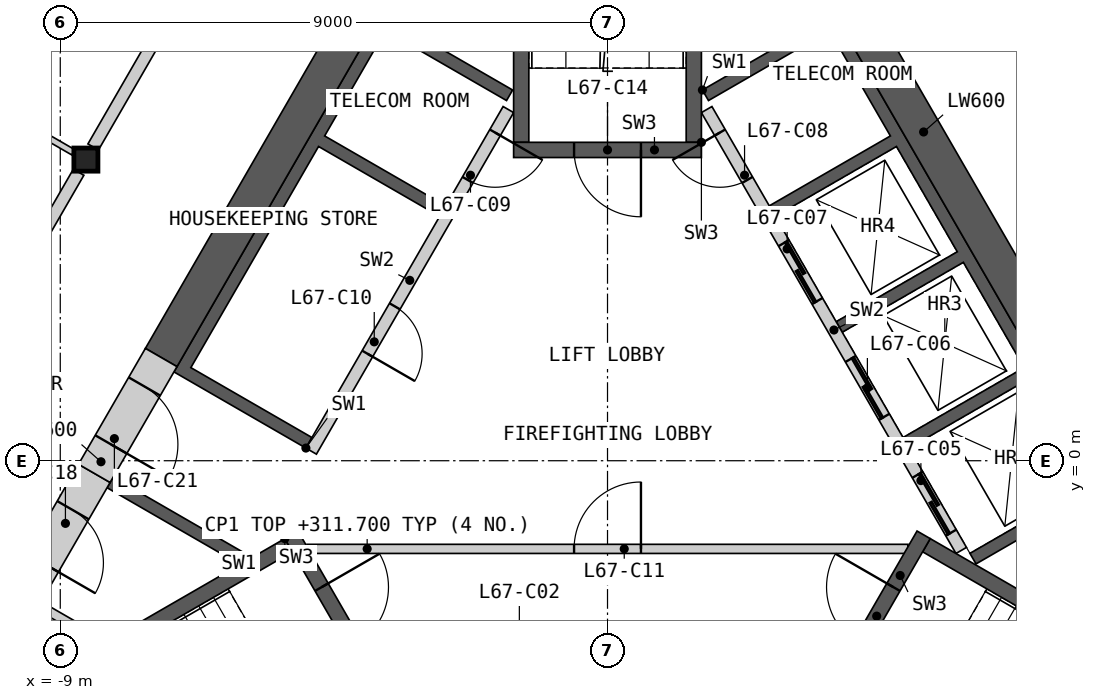
"""IFC4 building model, lengths in metres.
Left out: names, types, materials, properties, quantities, classifications, styles, units other than length and angle.
Written with IfcOpenShell. Run it as: python <this file> out.ifc"""

import sys

from ifc_helpers import new_model, si_unit, direction, frame, frame_2d, origin, origin_2d, place, context, subcontext, project, spatial, polyline, rectangle, i_section, outline, extrude, element, fill, save


model = new_model("IFC4")
c1 = context("Model", 3, precision=1e-05, world=origin(), true_north=direction((0.0, 1.0)))
c2 = subcontext(c1, "Body", "Model", "MODEL_VIEW")
j1 = project(units=[si_unit("LENGTHUNIT", "METRE"), si_unit("PLANEANGLEUNIT", "RADIAN")], contexts=[c1])
p1 = place(None, origin())
s1 = spatial("IfcSite", under=j1, at=p1, CompositionType="ELEMENT")
p2 = place(p1, origin())
s2 = spatial("IfcBuilding", under=s1, at=p2, CompositionType="ELEMENT")
p3 = place(p2, frame((0.0, 0.0, 308.6)))
s3 = spatial("IfcBuildingStorey", under=s2, at=p3, CompositionType="ELEMENT", Elevation=308.6)
p4 = place(p3, frame((-8.578, 4.953, 0.0), z_axis=(0.0, 0.0, 1.0), x_axis=(1.0, 0.0, 0.0)))
e1 = element("IfcColumn", 1, at=p4, inside=s3, PredefinedType="COLUMN", context=c2, shape_type="SweptSolid", body=[
    extrude(i_section(OverallWidth=0.396, OverallDepth=0.381, WebThickness=0.019, FlangeThickness=0.03, at=origin_2d()), origin(), (0.0, 0.0, 1.0), 3.4),
])
p5 = place(p3, origin())
e2 = element("IfcWall", 2, at=p5, inside=s3, PredefinedType="SHEAR", context=c2, shape_type="SweptSolid", body=[
    extrude(outline(polyline([(1.561, 6.097), (3.731, 7.35), (8.231, -0.444), (6.061, -1.697), (5.96, -1.524), (7.952, -0.374), (6.952, 1.358), (4.96, 0.208), (4.861, 0.381), (6.852, 1.531), (5.852, 3.263), (3.861, 2.113), (3.76, 2.287), (5.752, 3.437), (4.752, 5.169), (2.76, 4.019), (2.66, 4.192), (4.652, 5.342), (3.652, 7.074), (1.66, 5.924), (1.561, 6.097)])), origin(), (0.0, 0.0, 1.0), 3.1),
])
p6 = place(p3, frame((5.817, -1.476, 0.0), z_axis=(0.0, 0.0, 1.0), x_axis=(-0.500002616675, 0.866023893041, 0.0)))
e3 = element("IfcWall", 3, at=p6, inside=s3, PredefinedType="SOLIDWALL", context=c2, shape_type="SweptSolid", body=[
    extrude(rectangle(XDim=8.373, YDim=0.2, at=frame_2d((4.187, 0.0))), origin(), (0.0, 0.0, 1.0), 3.1),
])
p7 = place(p6, frame((0.337, 0.0, 0.0)))
e4 = element("IfcOpeningElement", 4, at=p7, cuts=e3, PredefinedType="OPENING", context=c2, shape_type="SweptSolid", body=[
    extrude(rectangle(XDim=1.1, YDim=2.1, at=frame_2d((0.55, 1.05))), frame((0.0, 0.11, 0.0), z_axis=(0.0, -1.0, 0.0), x_axis=(1.0, 0.0, 0.0)), (0.0, 0.0, 1.0), 0.22),
])
p8 = place(p6, frame((2.537, 0.0, 0.0)))
e5 = element("IfcOpeningElement", 5, at=p8, cuts=e3, PredefinedType="OPENING", context=c2, shape_type="SweptSolid", body=[
    extrude(rectangle(XDim=1.1, YDim=2.1, at=frame_2d((0.55, 1.05))), frame((0.0, 0.11, 0.0), z_axis=(0.0, -1.0, 0.0), x_axis=(1.0, 0.0, 0.0)), (0.0, 0.0, 1.0), 0.22),
])
p9 = place(p6, frame((4.737, 0.0, 0.0)))
e6 = element("IfcOpeningElement", 6, at=p9, cuts=e3, PredefinedType="OPENING", context=c2, shape_type="SweptSolid", body=[
    extrude(rectangle(XDim=1.1, YDim=2.1, at=frame_2d((0.55, 1.05))), frame((0.0, 0.11, 0.0), z_axis=(0.0, -1.0, 0.0), x_axis=(1.0, 0.0, 0.0)), (0.0, 0.0, 1.0), 0.22),
])
p10 = place(p6, frame((7.037, 0.0, 0.0)))
e7 = element("IfcOpeningElement", 7, at=p10, cuts=e3, PredefinedType="OPENING", context=c2, shape_type="SweptSolid", body=[
    extrude(rectangle(XDim=0.9, YDim=2.1, at=frame_2d((0.45, 1.05))), frame((0.0, 0.11, 0.0), z_axis=(0.0, -1.0, 0.0), x_axis=(1.0, 0.0, 0.0)), (0.0, 0.0, 1.0), 0.22),
])
p11 = place(p3, origin())
e8 = element("IfcWall", 8, at=p11, inside=s3, PredefinedType="SHEAR", context=c2, shape_type="SweptSolid", body=[
    extrude(outline(polyline([(-6.061, -1.697), (-8.231, -0.444), (-8.131, -0.271), (-5.96, -1.524), (-6.061, -1.697)])), origin(), (0.0, 0.0, 1.0), 3.1),
])
p12 = place(p3, origin())
e9 = element("IfcWall", 9, at=p12, inside=s3, PredefinedType="SHEAR", context=c2, shape_type="SweptSolid", body=[
    extrude(outline(polyline([(-4.96, 0.208), (-7.131, 1.461), (-3.731, 7.35), (-1.561, 6.097), (-1.66, 5.924), (-3.652, 7.074), (-4.652, 5.342), (-2.66, 4.192), (-2.76, 4.019), (-4.752, 5.169), (-6.852, 1.531), (-4.861, 0.381), (-4.96, 0.208)])), origin(), (0.0, 0.0, 1.0), 3.1),
])
p13 = place(p3, frame((-1.631, 5.776, 0.0), z_axis=(0.0, 0.0, 1.0), x_axis=(-0.499992876559, -0.866029516466, 0.0)))
e10 = element("IfcWall", 10, at=p13, inside=s3, PredefinedType="SOLIDWALL", context=c2, shape_type="SweptSolid", body=[
    extrude(rectangle(XDim=6.486, YDim=0.2, at=frame_2d((3.243, 0.0))), origin(), (0.0, 0.0, 1.0), 3.1),
])
p14 = place(p13, frame((0.437, 0.0, 0.0)))
e11 = element("IfcOpeningElement", 11, at=p14, cuts=e10, PredefinedType="OPENING", context=c2, shape_type="SweptSolid", body=[
    extrude(rectangle(XDim=0.9, YDim=2.1, at=frame_2d((0.45, 1.05))), frame((0.0, 0.11, 0.0), z_axis=(0.0, -1.0, 0.0), x_axis=(1.0, 0.0, 0.0)), (0.0, 0.0, 1.0), 0.22),
])
p15 = place(p13, frame((3.737, 0.0, 0.0)))
e12 = element("IfcOpeningElement", 12, at=p15, cuts=e10, PredefinedType="OPENING", context=c2, shape_type="SweptSolid", body=[
    extrude(rectangle(XDim=0.9, YDim=2.1, at=frame_2d((0.45, 1.05))), frame((0.0, 0.11, 0.0), z_axis=(0.0, -1.0, 0.0), x_axis=(1.0, 0.0, 0.0)), (0.0, 0.0, 1.0), 0.22),
])
p16 = place(p3, frame((-4.941, -1.45, 0.0), z_axis=(0.0, 0.0, 1.0), x_axis=(1.0, 0.0, 0.0)))
e13 = element("IfcWall", 13, at=p16, inside=s3, PredefinedType="PARTITIONING", context=c2, shape_type="SweptSolid", body=[
    extrude(rectangle(XDim=9.882, YDim=0.15, at=frame_2d((4.941, 0.0))), origin(), (0.0, 0.0, 1.0), 3.1),
])
p17 = place(p16, frame((4.391, 0.0, 0.0)))
e14 = element("IfcOpeningElement", 14, at=p17, cuts=e13, PredefinedType="OPENING", context=c2, shape_type="SweptSolid", body=[
    extrude(rectangle(XDim=1.1, YDim=2.1, at=frame_2d((0.55, 1.05))), frame((0.0, 0.085, 0.0), z_axis=(0.0, -1.0, 0.0), x_axis=(1.0, 0.0, 0.0)), (0.0, 0.0, 1.0), 0.17),
])
p18 = place(p3, origin())
e15 = element("IfcWall", 15, at=p18, inside=s3, PredefinedType="SHEAR", context=c2, shape_type="SweptSolid", body=[
    extrude(outline(polyline([(-5.307, -1.281), (-10.374, -4.206), (-10.032, -4.298), (-5.182, -1.498), (-5.307, -1.281)])), origin(), (0.0, 0.0, 1.0), 3.1),
])
p19 = place(p3, frame((-5.199, -1.219, 0.0), z_axis=(0.0, 0.0, 1.0), x_axis=(0.499982516597, -0.866035497597, 0.0)))
e16 = element("IfcWall", 16, at=p19, inside=s3, PredefinedType="SHEAR", context=c2, shape_type="SweptSolid", body=[
    extrude(rectangle(XDim=3.088, YDim=0.25, at=frame_2d((1.544, 0.0))), origin(), (0.0, 0.0, 1.0), 3.1),
])
p20 = place(p19, frame((0.994, 0.0, 0.0)))
e17 = element("IfcOpeningElement", 17, at=p20, cuts=e16, PredefinedType="OPENING", context=c2, shape_type="SweptSolid", body=[
    extrude(rectangle(XDim=1.1, YDim=2.1, at=frame_2d((0.55, 1.05))), frame((0.0, 0.135, 0.0), z_axis=(0.0, -1.0, 0.0), x_axis=(1.0, 0.0, 0.0)), (0.0, 0.0, 1.0), 0.27),
])
p21 = place(p3, origin())
e18 = element("IfcWall", 18, at=p21, inside=s3, PredefinedType="SHEAR", context=c2, shape_type="SweptSolid", body=[
    extrude(outline(polyline([(10.032, -4.298), (10.374, -4.206), (5.307, -1.281), (5.182, -1.498), (10.032, -4.298)])), origin(), (0.0, 0.0, 1.0), 3.1),
])
p22 = place(p3, frame((3.655, -3.893, 0.0), z_axis=(0.0, 0.0, 1.0), x_axis=(0.499982516597, 0.866035497597, 0.0)))
e19 = element("IfcWall", 19, at=p22, inside=s3, PredefinedType="SHEAR", context=c2, shape_type="SweptSolid", body=[
    extrude(rectangle(XDim=3.088, YDim=0.25, at=frame_2d((1.544, 0.0))), origin(), (0.0, 0.0, 1.0), 3.1),
])
p23 = place(p22, frame((0.994, 0.0, 0.0)))
e20 = element("IfcOpeningElement", 20, at=p23, cuts=e19, PredefinedType="OPENING", context=c2, shape_type="SweptSolid", body=[
    extrude(rectangle(XDim=1.1, YDim=2.1, at=frame_2d((0.55, 1.05))), frame((0.0, 0.135, 0.0), z_axis=(0.0, -1.0, 0.0), x_axis=(1.0, 0.0, 0.0)), (0.0, 0.0, 1.0), 0.27),
])
p24 = place(p3, origin())
e21 = element("IfcWall", 21, at=p24, inside=s3, PredefinedType="SHEAR", context=c2, shape_type="SweptSolid", body=[
    extrude(outline(polyline([(1.544, 5.237), (1.544, 11.087), (1.294, 10.837), (1.294, 5.237), (1.544, 5.237)])), origin(), (0.0, 0.0, 1.0), 3.1),
])
p25 = place(p3, origin())
e22 = element("IfcWall", 22, at=p25, inside=s3, PredefinedType="SHEAR", context=c2, shape_type="SweptSolid", body=[
    extrude(outline(polyline([(-1.294, 10.837), (-1.544, 11.087), (-1.544, 5.237), (-1.294, 5.237), (-1.294, 10.837)])), origin(), (0.0, 0.0, 1.0), 3.1),
])
p26 = place(p3, frame((1.544, 5.112, 0.0), z_axis=(0.0, 0.0, 1.0), x_axis=(-1.0, 0.0, 0.0)))
e23 = element("IfcWall", 23, at=p26, inside=s3, PredefinedType="SHEAR", context=c2, shape_type="SweptSolid", body=[
    extrude(rectangle(XDim=3.088, YDim=0.25, at=frame_2d((1.544, 0.0))), origin(), (0.0, 0.0, 1.0), 3.1),
])
p27 = place(p26, frame((0.994, 0.0, 0.0)))
e24 = element("IfcOpeningElement", 24, at=p27, cuts=e23, PredefinedType="OPENING", context=c2, shape_type="SweptSolid", body=[
    extrude(rectangle(XDim=1.1, YDim=2.1, at=frame_2d((0.55, 1.05))), frame((0.0, 0.135, 0.0), z_axis=(0.0, -1.0, 0.0), x_axis=(1.0, 0.0, 0.0)), (0.0, 0.0, 1.0), 0.27),
])
p28 = place(p3, frame((-9.35, -2.383, 0.0), z_axis=(0.0, 0.0, 1.0), x_axis=(0.866057962423, -0.499943602543, 0.0)))
e25 = element("IfcWall", 25, at=p28, inside=s3, PredefinedType="PARTITIONING", context=c2, shape_type="SweptSolid", body=[
    extrude(rectangle(XDim=1.242, YDim=0.15, at=frame_2d((0.621, 0.0))), origin(), (0.0, 0.0, 1.0), 3.1),
])
p29 = place(p3, frame((8.841, -0.902, 0.0), z_axis=(0.0, 0.0, 1.0), x_axis=(-0.499995618375, 0.866027933502, 0.0)))
e26 = element("IfcWall", 26, at=p29, inside=s3, PredefinedType="SHEAR", context=c2, shape_type="SweptSolid", body=[
    extrude(rectangle(XDim=14.571, YDim=0.6, at=frame_2d((7.285, 0.0))), origin(), (0.0, 0.0, 1.0), 3.1),
])
p30 = place(p3, frame((-3.639, 8.107, 0.0), z_axis=(0.0, 0.0, 1.0), x_axis=(-0.49999180351, -0.866030135978, 0.0)))
e27 = element("IfcWall", 27, at=p30, inside=s3, PredefinedType="SHEAR", context=c2, shape_type="SweptSolid", body=[
    extrude(rectangle(XDim=7.401, YDim=0.6, at=frame_2d((3.701, 0.0))), origin(), (0.0, 0.0, 1.0), 3.1),
])
p31 = place(p3, frame((-8.44, -0.208, 0.0), z_axis=(0.0, 0.0, 1.0), x_axis=(-0.500001951578, -0.866024277037, 0.0)))
e28 = element("IfcWall", 28, at=p31, inside=s3, PredefinedType="SHEAR", context=c2, shape_type="SweptSolid", body=[
    extrude(rectangle(XDim=2.243, YDim=0.6, at=frame_2d((1.122, 0.0))), origin(), (0.0, 0.0, 1.0), 3.1),
])
p32 = place(p31, frame((0.7, 0.0, 0.0)))
e29 = element("IfcOpeningElement", 29, at=p32, cuts=e28, PredefinedType="OPENING", context=c2, shape_type="SweptSolid", body=[
    extrude(rectangle(XDim=1.0, YDim=2.1, at=frame_2d((0.5, 1.05))), frame((0.0, 0.31, 0.0), z_axis=(0.0, -1.0, 0.0), x_axis=(1.0, 0.0, 0.0)), (0.0, 0.0, 1.0), 0.62),
])
p33 = place(p3, frame((-7.34, 1.698, 0.0), z_axis=(0.0, 0.0, 1.0), x_axis=(-0.50002983664, -0.866008176907, 0.0)))
e30 = element("IfcWall", 30, at=p33, inside=s3, PredefinedType="SHEAR", context=c2, shape_type="SweptSolid", body=[
    extrude(rectangle(XDim=2.2, YDim=0.6, at=frame_2d((1.1, 0.0))), origin(), (0.0, 0.0, 1.0), 3.1),
])
p34 = place(p33, frame((0.55, 0.0, 0.0)))
e31 = element("IfcOpeningElement", 31, at=p34, cuts=e30, PredefinedType="OPENING", context=c2, shape_type="SweptSolid", body=[
    extrude(rectangle(XDim=1.1, YDim=2.1, at=frame_2d((0.55, 1.05))), frame((0.0, 0.31, 0.0), z_axis=(0.0, -1.0, 0.0), x_axis=(1.0, 0.0, 0.0)), (0.0, 0.0, 1.0), 0.62),
])
p35 = place(p3, frame((4.409, 12.174, 0.0), z_axis=(0.0, 0.0, 1.0), x_axis=(0.499984266882, -0.866034487114, 0.0)))
e32 = element("IfcWall", 32, at=p35, inside=s3, PredefinedType="PARTITIONING", context=c2, shape_type="SweptSolid", body=[
    extrude(rectangle(XDim=8.099, YDim=0.2, at=frame_2d((4.049, 0.0))), origin(), (0.0, 0.0, 1.0), 3.1),
])
p36 = place(p35, frame((5.123, 0.0, 0.0)))
e33 = element("IfcOpeningElement", 33, at=p36, cuts=e32, PredefinedType="OPENING", context=c2, shape_type="SweptSolid", body=[
    extrude(rectangle(XDim=1.0, YDim=2.1, at=frame_2d((0.5, 1.05))), frame((0.0, 0.11, 0.0), z_axis=(0.0, -1.0, 0.0), x_axis=(1.0, 0.0, 0.0)), (0.0, 0.0, 1.0), 0.22),
])
p37 = place(p35, frame((1.164, 0.0, 0.0)))
e34 = element("IfcOpeningElement", 34, at=p37, cuts=e32, PredefinedType="OPENING", context=c2, shape_type="SweptSolid", body=[
    extrude(rectangle(XDim=1.0, YDim=2.1, at=frame_2d((0.5, 1.05))), frame((0.0, 0.11, 0.0), z_axis=(0.0, -1.0, 0.0), x_axis=(1.0, 0.0, 0.0)), (0.0, 0.0, 1.0), 0.22),
])
p38 = place(p3, frame((-8.458, 5.16, 0.0), z_axis=(0.0, 0.0, 1.0), x_axis=(0.499984266882, 0.866034487114, 0.0)))
e35 = element("IfcWall", 35, at=p38, inside=s3, PredefinedType="PARTITIONING", context=c2, shape_type="SweptSolid", body=[
    extrude(rectangle(XDim=8.099, YDim=0.2, at=frame_2d((4.049, 0.0))), origin(), (0.0, 0.0, 1.0), 3.1),
])
p39 = place(p38, frame((3.093, 0.0, 0.0)))
e36 = element("IfcOpeningElement", 36, at=p39, cuts=e35, PredefinedType="OPENING", context=c2, shape_type="SweptSolid", body=[
    extrude(rectangle(XDim=1.0, YDim=2.1, at=frame_2d((0.5, 1.05))), frame((0.0, 0.11, 0.0), z_axis=(0.0, -1.0, 0.0), x_axis=(1.0, 0.0, 0.0)), (0.0, 0.0, 1.0), 0.22),
])
p40 = place(p3, frame((-12.748, -2.269, 0.0), z_axis=(0.0, 0.0, 1.0), x_axis=(0.499984266882, 0.866034487114, 0.0)))
e37 = element("IfcWall", 37, at=p40, inside=s3, PredefinedType="PARTITIONING", context=c2, shape_type="SweptSolid", body=[
    extrude(rectangle(XDim=8.099, YDim=0.2, at=frame_2d((4.049, 0.0))), origin(), (0.0, 0.0, 1.0), 3.1),
])
p41 = place(p40, frame((1.164, 0.0, 0.0)))
e38 = element("IfcOpeningElement", 38, at=p41, cuts=e37, PredefinedType="OPENING", context=c2, shape_type="SweptSolid", body=[
    extrude(rectangle(XDim=1.0, YDim=2.1, at=frame_2d((0.5, 1.05))), frame((0.0, 0.11, 0.0), z_axis=(0.0, -1.0, 0.0), x_axis=(1.0, 0.0, 0.0)), (0.0, 0.0, 1.0), 0.22),
])
p42 = place(p3, frame((-16.054, 3.419, 0.0), z_axis=(0.0, 0.0, 1.0), x_axis=(0.499999256795, 0.866025832873, 0.0)))
e39 = element("IfcWall", 39, at=p42, inside=s3, PredefinedType="PARTITIONING", context=c2, shape_type="SweptSolid", body=[
    extrude(rectangle(XDim=15.448, YDim=0.1, at=frame_2d((7.724, 0.0))), origin(), (0.0, 0.0, 1.0), 2.33),
])
p43 = place(p42, frame((8.306, 0.0, 0.0)))
e40 = element("IfcOpeningElement", 40, at=p43, cuts=e39, PredefinedType="OPENING", context=c2, shape_type="SweptSolid", body=[
    extrude(rectangle(XDim=0.95, YDim=2.1, at=frame_2d((0.475, 1.05))), frame((0.0, 0.06, 0.0), z_axis=(0.0, -1.0, 0.0), x_axis=(1.0, 0.0, 0.0)), (0.0, 0.0, 1.0), 0.12),
])
p44 = place(p42, frame((1.76, 0.0, 0.0)))
e41 = element("IfcOpeningElement", 41, at=p44, cuts=e39, PredefinedType="OPENING", context=c2, shape_type="SweptSolid", body=[
    extrude(rectangle(XDim=0.95, YDim=2.1, at=frame_2d((0.475, 1.05))), frame((0.0, 0.06, 0.0), z_axis=(0.0, -1.0, 0.0), x_axis=(1.0, 0.0, 0.0)), (0.0, 0.0, 1.0), 0.12),
])
p45 = place(p3, frame((-19.615, 11.325, 0.0), z_axis=(0.0, 0.0, 1.0), x_axis=(0.86602139559, -0.500006942333, 0.0)))
e42 = element("IfcWall", 42, at=p45, inside=s3, PredefinedType="PARTITIONING", context=c2, shape_type="SweptSolid", body=[
    extrude(rectangle(XDim=12.505, YDim=0.1, at=frame_2d((6.252, 0.0))), origin(), (0.0, 0.0, 1.0), 2.33),
])
p46 = place(p45, frame((4.37, 0.0, 0.0)))
e43 = element("IfcOpeningElement", 43, at=p46, cuts=e42, PredefinedType="OPENING", context=c2, shape_type="SweptSolid", body=[
    extrude(rectangle(XDim=0.95, YDim=2.1, at=frame_2d((0.475, 1.05))), frame((0.0, 0.06, 0.0), z_axis=(0.0, -1.0, 0.0), x_axis=(1.0, 0.0, 0.0)), (0.0, 0.0, 1.0), 0.12),
])
p47 = place(p7, origin())
e44 = element("IfcDoor", 44, at=p47, inside=s3, OperationType="SLIDING_TO_LEFT", PredefinedType="DOOR", context=c2, shape_type="SweptSolid", body=[
    extrude(rectangle(XDim=1.1, YDim=2.1, at=frame_2d((0.55, 1.05))), frame((0.0, 0.025, 0.0), z_axis=(0.0, -1.0, 0.0), x_axis=(1.0, 0.0, 0.0)), (0.0, 0.0, 1.0), 0.05),
])
fill(e4, e44)
p48 = place(p8, origin())
e45 = element("IfcDoor", 45, at=p48, inside=s3, OperationType="SLIDING_TO_LEFT", PredefinedType="DOOR", context=c2, shape_type="SweptSolid", body=[
    extrude(rectangle(XDim=1.1, YDim=2.1, at=frame_2d((0.55, 1.05))), frame((0.0, 0.025, 0.0), z_axis=(0.0, -1.0, 0.0), x_axis=(1.0, 0.0, 0.0)), (0.0, 0.0, 1.0), 0.05),
])
fill(e5, e45)
p49 = place(p9, origin())
e46 = element("IfcDoor", 46, at=p49, inside=s3, OperationType="SLIDING_TO_LEFT", PredefinedType="DOOR", context=c2, shape_type="SweptSolid", body=[
    extrude(rectangle(XDim=1.1, YDim=2.1, at=frame_2d((0.55, 1.05))), frame((0.0, 0.025, 0.0), z_axis=(0.0, -1.0, 0.0), x_axis=(1.0, 0.0, 0.0)), (0.0, 0.0, 1.0), 0.05),
])
fill(e6, e46)
p50 = place(p10, origin())
e47 = element("IfcDoor", 47, at=p50, inside=s3, OperationType="SINGLE_SWING_RIGHT", PredefinedType="DOOR", context=c2, shape_type="SweptSolid", body=[
    extrude(rectangle(XDim=0.9, YDim=2.1, at=frame_2d((0.45, 1.05))), frame((0.0, 0.025, 0.0), z_axis=(0.0, -1.0, 0.0), x_axis=(1.0, 0.0, 0.0)), (0.0, 0.0, 1.0), 0.05),
])
fill(e7, e47)
p51 = place(p14, origin())
e48 = element("IfcDoor", 48, at=p51, inside=s3, OperationType="SINGLE_SWING_LEFT", PredefinedType="DOOR", context=c2, shape_type="SweptSolid", body=[
    extrude(rectangle(XDim=0.9, YDim=2.1, at=frame_2d((0.45, 1.05))), frame((0.0, 0.025, 0.0), z_axis=(0.0, -1.0, 0.0), x_axis=(1.0, 0.0, 0.0)), (0.0, 0.0, 1.0), 0.05),
])
fill(e11, e48)
p52 = place(p15, origin())
e49 = element("IfcDoor", 49, at=p52, inside=s3, OperationType="SINGLE_SWING_RIGHT", PredefinedType="DOOR", context=c2, shape_type="SweptSolid", body=[
    extrude(rectangle(XDim=0.9, YDim=2.1, at=frame_2d((0.45, 1.05))), frame((0.0, 0.025, 0.0), z_axis=(0.0, -1.0, 0.0), x_axis=(1.0, 0.0, 0.0)), (0.0, 0.0, 1.0), 0.05),
])
fill(e12, e49)
p53 = place(p17, origin())
e50 = element("IfcDoor", 50, at=p53, inside=s3, OperationType="SINGLE_SWING_RIGHT", PredefinedType="DOOR", context=c2, shape_type="SweptSolid", body=[
    extrude(rectangle(XDim=1.1, YDim=2.1, at=frame_2d((0.55, 1.05))), frame((0.0, 0.025, 0.0), z_axis=(0.0, -1.0, 0.0), x_axis=(1.0, 0.0, 0.0)), (0.0, 0.0, 1.0), 0.05),
])
fill(e14, e50)
p54 = place(p20, origin())
e51 = element("IfcDoor", 51, at=p54, inside=s3, OperationType="SINGLE_SWING_LEFT", PredefinedType="DOOR", context=c2, shape_type="SweptSolid", body=[
    extrude(rectangle(XDim=1.1, YDim=2.1, at=frame_2d((0.55, 1.05))), frame((0.0, 0.025, 0.0), z_axis=(0.0, -1.0, 0.0), x_axis=(1.0, 0.0, 0.0)), (0.0, 0.0, 1.0), 0.05),
])
fill(e17, e51)
p55 = place(p23, origin())
e52 = element("IfcDoor", 52, at=p55, inside=s3, OperationType="SINGLE_SWING_RIGHT", PredefinedType="DOOR", context=c2, shape_type="SweptSolid", body=[
    extrude(rectangle(XDim=1.1, YDim=2.1, at=frame_2d((0.55, 1.05))), frame((0.0, 0.025, 0.0), z_axis=(0.0, -1.0, 0.0), x_axis=(1.0, 0.0, 0.0)), (0.0, 0.0, 1.0), 0.05),
])
fill(e20, e52)
p56 = place(p27, origin())
e53 = element("IfcDoor", 53, at=p56, inside=s3, OperationType="SINGLE_SWING_LEFT", PredefinedType="DOOR", context=c2, shape_type="SweptSolid", body=[
    extrude(rectangle(XDim=1.1, YDim=2.1, at=frame_2d((0.55, 1.05))), frame((0.0, 0.025, 0.0), z_axis=(0.0, -1.0, 0.0), x_axis=(1.0, 0.0, 0.0)), (0.0, 0.0, 1.0), 0.05),
])
fill(e24, e53)
p57 = place(p32, origin())
e54 = element("IfcDoor", 54, at=p57, inside=s3, OperationType="SINGLE_SWING_RIGHT", PredefinedType="DOOR", context=c2, shape_type="SweptSolid", body=[
    extrude(rectangle(XDim=1.0, YDim=2.1, at=frame_2d((0.5, 1.05))), frame((0.0, 0.055, 0.0), z_axis=(0.0, -1.0, 0.0), x_axis=(1.0, 0.0, 0.0)), (0.0, 0.0, 1.0), 0.05),
])
fill(e29, e54)
p58 = place(p34, origin())
e55 = element("IfcDoor", 55, at=p58, inside=s3, OperationType="SINGLE_SWING_RIGHT", PredefinedType="DOOR", context=c2, shape_type="SweptSolid", body=[
    extrude(rectangle(XDim=1.1, YDim=2.1, at=frame_2d((0.55, 1.05))), frame((0.0, 0.055, 0.0), z_axis=(0.0, -1.0, 0.0), x_axis=(1.0, 0.0, 0.0)), (0.0, 0.0, 1.0), 0.05),
])
fill(e31, e55)
save(model, sys.argv[1])
